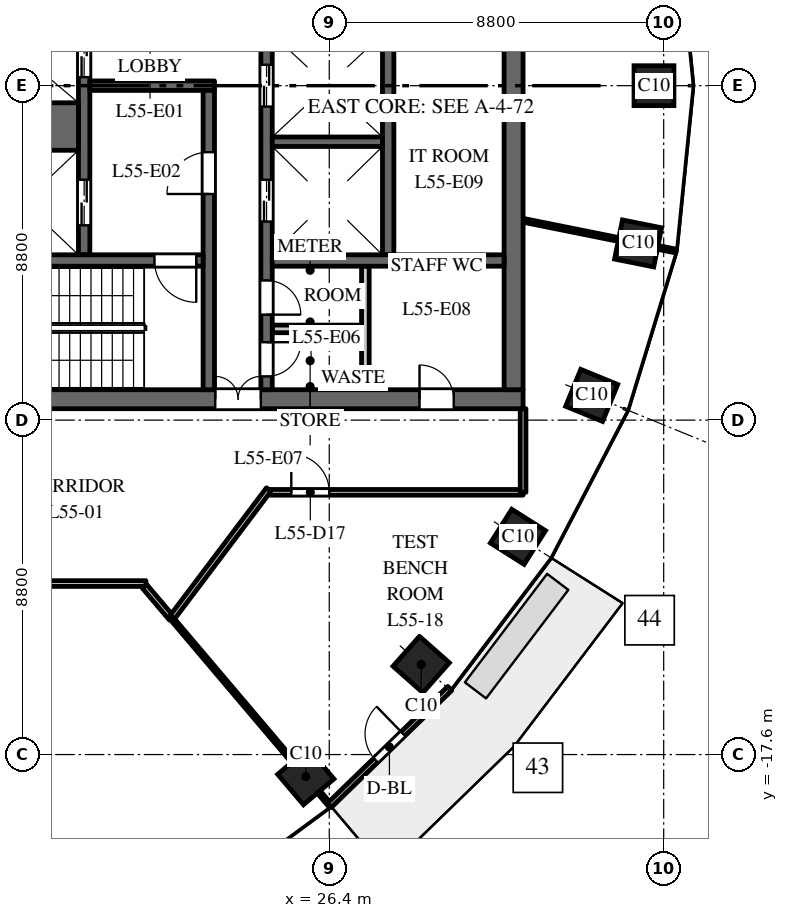
"""IFC4 building model, lengths in metres.
Left out: names, types, materials, properties, quantities, classifications, styles, units other than length and angle.
Written with IfcOpenShell. Run it as: python <this file> out.ifc"""

import sys

from ifc_helpers import new_model, si_unit, direction, frame, frame_2d, origin, origin_2d, place, context, subcontext, project, spatial, rectangle, extrude, element, fill, save


model = new_model("IFC4")
c1 = context("Model", 3, precision=1e-05, world=origin(), true_north=direction((0.0, 1.0)))
c2 = subcontext(c1, "Body", "Model", "MODEL_VIEW")
j1 = project(units=[si_unit("LENGTHUNIT", "METRE"), si_unit("PLANEANGLEUNIT", "RADIAN")], contexts=[c1])
p1 = place(None, origin())
s1 = spatial("IfcSite", under=j1, at=p1, CompositionType="ELEMENT")
p2 = place(p1, origin())
s2 = spatial("IfcBuilding", under=s1, at=p2, CompositionType="ELEMENT")
p3 = place(p2, frame((0.0, 0.0, 261.5)))
s3 = spatial("IfcBuildingStorey", under=s2, at=p3, CompositionType="ELEMENT", Elevation=261.5)
for number, where, z_axis, x_axis in (
    (1, (34.945, 0.0, 0.0), (0.0, 0.0, 1.0), (0.0, 1.0, 0.0)),
    (2, (25.783, -18.18, 0.0), (0.0, 0.0, 1.0), (0.763, 0.646, 0.0)),
    (3, (28.819, -15.23, 0.0), (0.0, 0.0, 1.0), (0.663, 0.749, 0.0)),
    (4, (31.365, -11.871, 0.0), (0.0, 0.0, 1.0), (0.535, 0.845, 0.0)),
    (5, (33.305, -8.149, 0.0), (0.0, 0.0, 1.0), (0.379, 0.925, 0.0)),
    (6, (34.527, -4.151, 0.0), (0.0, 0.0, 1.0), (0.197, 0.98, 0.0)),
):
    element("IfcColumn", number, at=place(p3, frame(where, z_axis=z_axis, x_axis=x_axis)), inside=s3, PredefinedType="COLUMN", context=c2, shape_type="SweptSolid", body=[
        extrude(rectangle(XDim=1.05, YDim=1.05, at=origin_2d()), origin(), (0.0, 0.0, 1.0), 4.0),
    ])
p4 = place(p3, frame((16.5, -8.25, 0.0), z_axis=(0.0, 0.0, 1.0), x_axis=(1.0, 0.0, 0.0)))
e7 = element("IfcWall", 7, at=p4, inside=s3, PredefinedType="SHEAR", context=c2, shape_type="SweptSolid", body=[
    extrude(rectangle(XDim=15.0, YDim=0.5, at=frame_2d((7.5, 0.0))), origin(), (0.0, 0.0, 1.0), 3.7),
])
p5 = place(p4, frame((6.9, 0.0, 0.0)))
e8 = element("IfcOpeningElement", 8, at=p5, cuts=e7, PredefinedType="OPENING", context=c2, shape_type="SweptSolid", body=[
    extrude(rectangle(XDim=1.2, YDim=2.1, at=frame_2d((0.6, 1.05))), frame((0.0, 0.26, 0.0), z_axis=(0.0, -1.0, 0.0), x_axis=(1.0, 0.0, 0.0)), (0.0, 0.0, 1.0), 0.52),
])
p6 = place(p4, frame((12.275, 0.0, 0.0)))
e9 = element("IfcOpeningElement", 9, at=p6, cuts=e7, PredefinedType="OPENING", context=c2, shape_type="SweptSolid", body=[
    extrude(rectangle(XDim=0.9, YDim=2.1, at=frame_2d((0.45, 1.05))), frame((0.0, 0.26, 0.0), z_axis=(0.0, -1.0, 0.0), x_axis=(1.0, 0.0, 0.0)), (0.0, 0.0, 1.0), 0.52),
])
p7 = place(p3, frame((27.95, -4.45, 0.0), z_axis=(0.0, 0.0, 1.0), x_axis=(0.0, 1.0, 0.0)))
e10 = element("IfcWall", 10, at=p7, inside=s3, PredefinedType="SHEAR", context=c2, shape_type="SweptSolid", body=[
    extrude(rectangle(XDim=8.9, YDim=0.3, at=frame_2d((4.45, 0.0))), origin(), (0.0, 0.0, 1.0), 3.7),
])
p8 = place(p3, frame((19.95, -4.45, 0.0), z_axis=(0.0, 0.0, 1.0), x_axis=(0.0, 1.0, 0.0)))
e11 = element("IfcWall", 11, at=p8, inside=s3, PredefinedType="SHEAR", context=c2, shape_type="SweptSolid", body=[
    extrude(rectangle(XDim=8.9, YDim=0.3, at=frame_2d((4.45, 0.0))), origin(), (0.0, 0.0, 1.0), 3.7),
])
p9 = place(p8, frame((0.775, 0.0, 0.0)))
e12 = element("IfcOpeningElement", 12, at=p9, cuts=e11, PredefinedType="OPENING", context=c2, shape_type="SweptSolid", body=[
    extrude(rectangle(XDim=1.2, YDim=2.1, at=frame_2d((0.6, 1.05))), frame((0.0, 0.16, 0.0), z_axis=(0.0, -1.0, 0.0), x_axis=(1.0, 0.0, 0.0)), (0.0, 0.0, 1.0), 0.32),
])
p10 = place(p8, frame((4.675, 0.0, 0.0)))
e13 = element("IfcOpeningElement", 13, at=p10, cuts=e11, PredefinedType="OPENING", context=c2, shape_type="SweptSolid", body=[
    extrude(rectangle(XDim=1.1, YDim=2.1, at=frame_2d((0.55, 1.05))), frame((0.0, 0.16, 0.0), z_axis=(0.0, -1.0, 0.0), x_axis=(1.0, 0.0, 0.0)), (0.0, 0.0, 1.0), 0.32),
])
p11 = place(p8, frame((7.25, 0.0, 0.0)))
e14 = element("IfcOpeningElement", 14, at=p11, cuts=e11, PredefinedType="OPENING", context=c2, shape_type="SweptSolid", body=[
    extrude(rectangle(XDim=1.1, YDim=2.1, at=frame_2d((0.55, 1.05))), frame((0.0, 0.16, 0.0), z_axis=(0.0, -1.0, 0.0), x_axis=(1.0, 0.0, 0.0)), (0.0, 0.0, 1.0), 0.32),
])
p12 = place(p3, frame((24.75, -8.0, 0.0), z_axis=(0.0, 0.0, 1.0), x_axis=(0.0, 1.0, 0.0)))
e15 = element("IfcWall", 15, at=p12, inside=s3, PredefinedType="SHEAR", context=c2, shape_type="SweptSolid", body=[
    extrude(rectangle(XDim=16.0, YDim=0.3, at=frame_2d((8.0, 0.0))), origin(), (0.0, 0.0, 1.0), 3.7),
])
p13 = place(p12, frame((4.425, 0.0, 0.0)))
e16 = element("IfcOpeningElement", 16, at=p13, cuts=e15, PredefinedType="OPENING", context=c2, shape_type="SweptSolid", body=[
    extrude(rectangle(XDim=1.1, YDim=2.1, at=frame_2d((0.55, 1.05))), frame((0.0, 0.16, 0.0), z_axis=(0.0, -1.0, 0.0), x_axis=(1.0, 0.0, 0.0)), (0.0, 0.0, 1.0), 0.32),
])
p14 = place(p12, frame((7.45, 0.0, 0.0)))
e17 = element("IfcOpeningElement", 17, at=p14, cuts=e15, PredefinedType="OPENING", context=c2, shape_type="SweptSolid", body=[
    extrude(rectangle(XDim=1.1, YDim=2.1, at=frame_2d((0.55, 1.05))), frame((0.0, 0.16, 0.0), z_axis=(0.0, -1.0, 0.0), x_axis=(1.0, 0.0, 0.0)), (0.0, 0.0, 1.0), 0.32),
])
p15 = place(p12, frame((10.475, 0.0, 0.0)))
e18 = element("IfcOpeningElement", 18, at=p15, cuts=e15, PredefinedType="OPENING", context=c2, shape_type="SweptSolid", body=[
    extrude(rectangle(XDim=1.1, YDim=2.1, at=frame_2d((0.55, 1.05))), frame((0.0, 0.16, 0.0), z_axis=(0.0, -1.0, 0.0), x_axis=(1.0, 0.0, 0.0)), (0.0, 0.0, 1.0), 0.32),
])
p16 = place(p12, frame((13.75, 0.0, 0.0)))
e19 = element("IfcOpeningElement", 19, at=p16, cuts=e15, PredefinedType="OPENING", context=c2, shape_type="SweptSolid", body=[
    extrude(rectangle(XDim=0.9, YDim=2.1, at=frame_2d((0.45, 1.05))), frame((0.0, 0.16, 0.0), z_axis=(0.0, -1.0, 0.0), x_axis=(1.0, 0.0, 0.0)), (0.0, 0.0, 1.0), 0.32),
])
p17 = place(p12, frame((1.975, 0.0, 0.0)))
e20 = element("IfcOpeningElement", 20, at=p17, cuts=e15, PredefinedType="OPENING", context=c2, shape_type="SweptSolid", body=[
    extrude(rectangle(XDim=0.9, YDim=2.1, at=frame_2d((0.45, 1.05))), frame((0.0, 0.16, 0.0), z_axis=(0.0, -1.0, 0.0), x_axis=(1.0, 0.0, 0.0)), (0.0, 0.0, 1.0), 0.32),
])
p18 = place(p12, frame((0.35, 0.0, 0.0)))
e21 = element("IfcOpeningElement", 21, at=p18, cuts=e15, PredefinedType="OPENING", context=c2, shape_type="SweptSolid", body=[
    extrude(rectangle(XDim=0.9, YDim=2.1, at=frame_2d((0.45, 1.05))), frame((0.0, 0.16, 0.0), z_axis=(0.0, -1.0, 0.0), x_axis=(1.0, 0.0, 0.0)), (0.0, 0.0, 1.0), 0.32),
])
p19 = place(p3, frame((20.1, 0.0, 0.0), z_axis=(0.0, 0.0, 1.0), x_axis=(1.0, 0.0, 0.0)))
e22 = element("IfcWall", 22, at=p19, inside=s3, PredefinedType="SHEAR", context=c2, shape_type="SweptSolid", body=[
    extrude(rectangle(XDim=3.28, YDim=0.25, at=frame_2d((1.64, 0.0))), origin(), (0.0, 0.0, 1.0), 3.7),
])
p20 = place(p3, frame((31.25, -8.0, 0.0), z_axis=(0.0, 0.0, 1.0), x_axis=(0.0, 1.0, 0.0)))
e23 = element("IfcWall", 23, at=p20, inside=s3, PredefinedType="SHEAR", context=c2, shape_type="SweptSolid", body=[
    extrude(rectangle(XDim=16.0, YDim=0.5, at=frame_2d((8.0, 0.0))), origin(), (0.0, 0.0, 1.0), 3.7),
])
p21 = place(p3, frame((27.35, -8.0, 0.0), z_axis=(0.0, 0.0, 1.0), x_axis=(0.0, 1.0, 0.0)))
e24 = element("IfcWall", 24, at=p21, inside=s3, PredefinedType="PARTITIONING", context=c2, shape_type="SweptSolid", body=[
    extrude(rectangle(XDim=3.25, YDim=0.2, at=frame_2d((1.625, 0.0))), origin(), (0.0, 0.0, 1.0), 3.7),
])
p22 = place(p3, frame((24.9, -6.4, 0.0), z_axis=(0.0, 0.0, 1.0), x_axis=(1.0, 0.0, 0.0)))
e25 = element("IfcWall", 25, at=p22, inside=s3, PredefinedType="PARTITIONING", context=c2, shape_type="SweptSolid", body=[
    extrude(rectangle(XDim=2.35, YDim=0.2, at=frame_2d((1.175, 0.0))), origin(), (0.0, 0.0, 1.0), 3.7),
])
p23 = place(p3, frame((24.9, -4.6, 0.0), z_axis=(0.0, 0.0, 1.0), x_axis=(1.0, 0.0, 0.0)))
e26 = element("IfcWall", 26, at=p23, inside=s3, PredefinedType="SHEAR", context=c2, shape_type="SweptSolid", body=[
    extrude(rectangle(XDim=6.1, YDim=0.3, at=frame_2d((3.05, 0.0))), origin(), (0.0, 0.0, 1.0), 3.7),
])
p24 = place(p3, frame((16.9, -1.075, 0.0), z_axis=(0.0, 0.0, 1.0), x_axis=(1.0, 0.0, 0.0)))
e27 = element("IfcWall", 27, at=p24, inside=s3, PredefinedType="SHEAR", context=c2, shape_type="SweptSolid", body=[
    extrude(rectangle(XDim=2.9, YDim=1.25, at=frame_2d((1.45, 0.0))), origin(), (0.0, 0.0, 1.0), 3.7),
])
p25 = place(p3, frame((24.9, -1.475, 0.0), z_axis=(0.0, 0.0, 1.0), x_axis=(1.0, 0.0, 0.0)))
e28 = element("IfcWall", 28, at=p25, inside=s3, PredefinedType="SHEAR", context=c2, shape_type="SweptSolid", body=[
    extrude(rectangle(XDim=2.9, YDim=0.25, at=frame_2d((1.45, 0.0))), origin(), (0.0, 0.0, 1.0), 3.7),
])
p26 = place(p3, frame((23.23, -8.0, 0.0), z_axis=(0.0, 0.0, 1.0), x_axis=(0.0, 1.0, 0.0)))
e29 = element("IfcWall", 29, at=p26, inside=s3, PredefinedType="SHEAR", context=c2, shape_type="SweptSolid", body=[
    extrude(rectangle(XDim=7.875, YDim=0.3, at=frame_2d((3.938, 0.0))), origin(), (0.0, 0.0, 1.0), 3.7),
])
p27 = place(p26, frame((5.15, 0.0, 0.0)))
e30 = element("IfcOpeningElement", 30, at=p27, cuts=e29, PredefinedType="OPENING", context=c2, shape_type="SweptSolid", body=[
    extrude(rectangle(XDim=1.1, YDim=2.1, at=frame_2d((0.55, 1.05))), frame((0.0, 0.16, 0.0), z_axis=(0.0, -1.0, 0.0), x_axis=(1.0, 0.0, 0.0)), (0.0, 0.0, 1.0), 0.32),
])
p28 = place(p3, frame((16.9, -4.6, 0.0), z_axis=(0.0, 0.0, 1.0), x_axis=(1.0, 0.0, 0.0)))
e31 = element("IfcWall", 31, at=p28, inside=s3, PredefinedType="SHEAR", context=c2, shape_type="SweptSolid", body=[
    extrude(rectangle(XDim=6.18, YDim=0.3, at=frame_2d((3.09, 0.0))), origin(), (0.0, 0.0, 1.0), 3.7),
])
p29 = place(p28, frame((4.9, 0.0, 0.0)))
e32 = element("IfcOpeningElement", 32, at=p29, cuts=e31, PredefinedType="OPENING", context=c2, shape_type="SweptSolid", body=[
    extrude(rectangle(XDim=1.1, YDim=2.1, at=frame_2d((0.55, 1.05))), frame((0.0, 0.16, 0.0), z_axis=(0.0, -1.0, 0.0), x_axis=(1.0, 0.0, 0.0)), (0.0, 0.0, 1.0), 0.32),
])
p30 = place(p3, frame((26.396, -18.943, 0.0), z_axis=(0.0, 0.0, 1.0), x_axis=(0.717214761864, 0.696852197647, 0.0)))
e33 = element("IfcWall", 33, at=p30, inside=s3, PredefinedType="STANDARD", context=c2, shape_type="SweptSolid", body=[
    extrude(rectangle(XDim=4.424, YDim=0.15, at=frame_2d((2.212, 0.0))), origin(), (0.0, 0.0, 1.0), 3.7),
])
p31 = place(p30, frame((1.712, 0.0, 0.0)))
e34 = element("IfcOpeningElement", 34, at=p31, cuts=e33, PredefinedType="OPENING", context=c2, shape_type="SweptSolid", body=[
    extrude(rectangle(XDim=1.0, YDim=2.4, at=frame_2d((0.5, 1.2))), frame((0.0, 0.085, 0.0), z_axis=(0.0, -1.0, 0.0), x_axis=(1.0, 0.0, 0.0)), (0.0, 0.0, 1.0), 0.17),
])
p32 = place(p3, frame((7.524, -13.1, 0.0), z_axis=(0.0, 0.0, 1.0), x_axis=(1.0, 0.0, 0.0)))
e35 = element("IfcWall", 35, at=p32, inside=s3, PredefinedType="PARTITIONING", context=c2, shape_type="SweptSolid", body=[
    extrude(rectangle(XDim=14.052, YDim=0.15, at=frame_2d((7.026, 0.0))), origin(), (0.0, 0.0, 1.0), 2.85),
])
p33 = place(p32, frame((0.633, 0.0, 0.0)))
e36 = element("IfcOpeningElement", 36, at=p33, cuts=e35, PredefinedType="OPENING", context=c2, shape_type="SweptSolid", body=[
    extrude(rectangle(XDim=1.0, YDim=2.1, at=frame_2d((0.5, 1.05))), frame((0.0, 0.085, 0.0), z_axis=(0.0, -1.0, 0.0), x_axis=(1.0, 0.0, 0.0)), (0.0, 0.0, 1.0), 0.17),
])
p34 = place(p3, frame((21.541, -13.175, 0.0), z_axis=(0.0, 0.0, 1.0), x_axis=(0.646460291141, -0.762947633837, 0.0)))
e37 = element("IfcWall", 37, at=p34, inside=s3, PredefinedType="PARTITIONING", context=c2, shape_type="SweptSolid", body=[
    extrude(rectangle(XDim=1.098, YDim=0.15, at=frame_2d((0.549, 0.0))), origin(), (0.0, 0.0, 1.0), 3.7),
])
p35 = place(p3, frame((22.251, -14.013, 0.0), z_axis=(0.0, 0.0, 1.0), x_axis=(0.602435944628, 0.798167233492, 0.0)))
e38 = element("IfcWall", 38, at=p35, inside=s3, PredefinedType="PARTITIONING", context=c2, shape_type="SweptSolid", body=[
    extrude(rectangle(XDim=4.245, YDim=0.15, at=frame_2d((2.122, 0.0))), origin(), (0.0, 0.0, 1.0), 2.75),
])
p36 = place(p3, frame((22.251, -14.013, 0.0), z_axis=(0.0, 0.0, 1.0), x_axis=(0.646448300096, -0.76295779392, 0.0)))
e39 = element("IfcWall", 39, at=p36, inside=s3, PredefinedType="PARTITIONING", context=c2, shape_type="SweptSolid", body=[
    extrude(rectangle(XDim=6.465, YDim=0.1, at=frame_2d((3.232, 0.0))), origin(), (0.0, 0.0, 1.0), 3.0),
])
p37 = place(p3, frame((24.845, -10.7, 0.0), z_axis=(0.0, 0.0, 1.0), x_axis=(1.0, 0.0, 0.0)))
e40 = element("IfcWall", 40, at=p37, inside=s3, PredefinedType="PARTITIONING", context=c2, shape_type="SweptSolid", body=[
    extrude(rectangle(XDim=6.655, YDim=0.15, at=frame_2d((3.328, 0.0))), origin(), (0.0, 0.0, 1.0), 3.0),
])
p38 = place(p37, frame((0.556, 0.0, 0.0)))
e41 = element("IfcOpeningElement", 41, at=p38, cuts=e40, PredefinedType="OPENING", context=c2, shape_type="SweptSolid", body=[
    extrude(rectangle(XDim=1.0, YDim=2.1, at=frame_2d((0.5, 1.05))), frame((0.0, 0.085, 0.0), z_axis=(0.0, -1.0, 0.0), x_axis=(1.0, 0.0, 0.0)), (0.0, 0.0, 1.0), 0.17),
])
p39 = place(p3, frame((31.5, -10.7, 0.0), z_axis=(0.0, 0.0, 1.0), x_axis=(0.0, 1.0, 0.0)))
e42 = element("IfcWall", 42, at=p39, inside=s3, PredefinedType="PARTITIONING", context=c2, shape_type="SweptSolid", body=[
    extrude(rectangle(XDim=2.2, YDim=0.15, at=frame_2d((1.1, 0.0))), origin(), (0.0, 0.0, 1.0), 3.0),
])
p40 = place(p3, frame((31.5, -3.542, 0.0), z_axis=(0.0, 0.0, 1.0), x_axis=(0.980357474535, -0.197228857227, 0.0)))
e43 = element("IfcWall", 43, at=p40, inside=s3, PredefinedType="PARTITIONING", context=c2, shape_type="SweptSolid", body=[
    extrude(rectangle(XDim=4.092, YDim=0.1, at=frame_2d((2.046, 0.0))), origin(), (0.0, 0.0, 1.0), 3.0),
])
p41 = place(p9, origin())
e44 = element("IfcDoor", 44, at=p41, inside=s3, OperationType="DOUBLE_DOOR_SLIDING", PredefinedType="DOOR", context=c2, shape_type="SweptSolid", body=[
    extrude(rectangle(XDim=1.2, YDim=2.1, at=frame_2d((0.6, 1.05))), frame((0.0, 0.025, 0.0), z_axis=(0.0, -1.0, 0.0), x_axis=(1.0, 0.0, 0.0)), (0.0, 0.0, 1.0), 0.05),
])
fill(e12, e44)
p42 = place(p10, origin())
e45 = element("IfcDoor", 45, at=p42, inside=s3, OperationType="DOUBLE_DOOR_SLIDING", PredefinedType="DOOR", context=c2, shape_type="SweptSolid", body=[
    extrude(rectangle(XDim=1.1, YDim=2.1, at=frame_2d((0.55, 1.05))), frame((0.0, 0.025, 0.0), z_axis=(0.0, -1.0, 0.0), x_axis=(1.0, 0.0, 0.0)), (0.0, 0.0, 1.0), 0.05),
])
fill(e13, e45)
p43 = place(p13, origin())
e46 = element("IfcDoor", 46, at=p43, inside=s3, OperationType="DOUBLE_DOOR_SLIDING", PredefinedType="DOOR", context=c2, shape_type="SweptSolid", body=[
    extrude(rectangle(XDim=1.1, YDim=2.1, at=frame_2d((0.55, 1.05))), frame((0.0, 0.025, 0.0), z_axis=(0.0, -1.0, 0.0), x_axis=(1.0, 0.0, 0.0)), (0.0, 0.0, 1.0), 0.05),
])
fill(e16, e46)
p44 = place(p14, origin())
e47 = element("IfcDoor", 47, at=p44, inside=s3, OperationType="DOUBLE_DOOR_SLIDING", PredefinedType="DOOR", context=c2, shape_type="SweptSolid", body=[
    extrude(rectangle(XDim=1.1, YDim=2.1, at=frame_2d((0.55, 1.05))), frame((0.0, 0.025, 0.0), z_axis=(0.0, -1.0, 0.0), x_axis=(1.0, 0.0, 0.0)), (0.0, 0.0, 1.0), 0.05),
])
fill(e17, e47)
p45 = place(p29, origin())
e48 = element("IfcDoor", 48, at=p45, inside=s3, OperationType="SINGLE_SWING_RIGHT", PredefinedType="DOOR", context=c2, shape_type="SweptSolid", body=[
    extrude(rectangle(XDim=1.1, YDim=2.1, at=frame_2d((0.55, 1.05))), frame((0.0, 0.025, 0.0), z_axis=(0.0, -1.0, 0.0), x_axis=(1.0, 0.0, 0.0)), (0.0, 0.0, 1.0), 0.05),
])
fill(e32, e48)
p46 = place(p27, origin())
e49 = element("IfcDoor", 49, at=p46, inside=s3, OperationType="SINGLE_SWING_RIGHT", PredefinedType="DOOR", context=c2, shape_type="SweptSolid", body=[
    extrude(rectangle(XDim=1.1, YDim=2.1, at=frame_2d((0.55, 1.05))), frame((0.0, 0.025, 0.0), z_axis=(0.0, -1.0, 0.0), x_axis=(1.0, 0.0, 0.0)), (0.0, 0.0, 1.0), 0.05),
])
fill(e30, e49)
p47 = place(p5, origin())
e50 = element("IfcDoor", 50, at=p47, inside=s3, OperationType="DOUBLE_DOOR_DOUBLE_SWING", PredefinedType="DOOR", context=c2, shape_type="SweptSolid", body=[
    extrude(rectangle(XDim=1.2, YDim=2.1, at=frame_2d((0.6, 1.05))), frame((0.0, 0.025, 0.0), z_axis=(0.0, -1.0, 0.0), x_axis=(1.0, 0.0, 0.0)), (0.0, 0.0, 1.0), 0.05),
])
fill(e8, e50)
p48 = place(p17, origin())
e51 = element("IfcDoor", 51, at=p48, inside=s3, OperationType="SINGLE_SWING_LEFT", PredefinedType="DOOR", context=c2, shape_type="SweptSolid", body=[
    extrude(rectangle(XDim=0.9, YDim=2.1, at=frame_2d((0.45, 1.05))), frame((0.0, 0.025, 0.0), z_axis=(0.0, -1.0, 0.0), x_axis=(1.0, 0.0, 0.0)), (0.0, 0.0, 1.0), 0.05),
])
fill(e20, e51)
p49 = place(p18, origin())
e52 = element("IfcDoor", 52, at=p49, inside=s3, OperationType="SINGLE_SWING_RIGHT", PredefinedType="DOOR", context=c2, shape_type="SweptSolid", body=[
    extrude(rectangle(XDim=0.9, YDim=2.1, at=frame_2d((0.45, 1.05))), frame((0.0, 0.025, 0.0), z_axis=(0.0, -1.0, 0.0), x_axis=(1.0, 0.0, 0.0)), (0.0, 0.0, 1.0), 0.05),
])
fill(e21, e52)
p50 = place(p6, origin())
e53 = element("IfcDoor", 53, at=p50, inside=s3, OperationType="SINGLE_SWING_RIGHT", PredefinedType="DOOR", context=c2, shape_type="SweptSolid", body=[
    extrude(rectangle(XDim=0.9, YDim=2.1, at=frame_2d((0.45, 1.05))), frame((0.0, 0.025, 0.0), z_axis=(0.0, -1.0, 0.0), x_axis=(1.0, 0.0, 0.0)), (0.0, 0.0, 1.0), 0.05),
])
fill(e9, e53)
p51 = place(p31, origin())
e54 = element("IfcDoor", 54, at=p51, inside=s3, OperationType="SINGLE_SWING_RIGHT", PredefinedType="DOOR", context=c2, shape_type="SweptSolid", body=[
    extrude(rectangle(XDim=1.0, YDim=2.4, at=frame_2d((0.5, 1.2))), frame((0.0, 0.025, 0.0), z_axis=(0.0, -1.0, 0.0), x_axis=(1.0, 0.0, 0.0)), (0.0, 0.0, 1.0), 0.05),
])
fill(e34, e54)
p52 = place(p38, origin())
e55 = element("IfcDoor", 55, at=p52, inside=s3, OperationType="SINGLE_SWING_LEFT", PredefinedType="DOOR", context=c2, shape_type="SweptSolid", body=[
    extrude(rectangle(XDim=1.0, YDim=2.1, at=frame_2d((0.5, 1.05))), frame((0.0, 0.025, 0.0), z_axis=(0.0, -1.0, 0.0), x_axis=(1.0, 0.0, 0.0)), (0.0, 0.0, 1.0), 0.05),
])
fill(e41, e55)
save(model, sys.argv[1])
